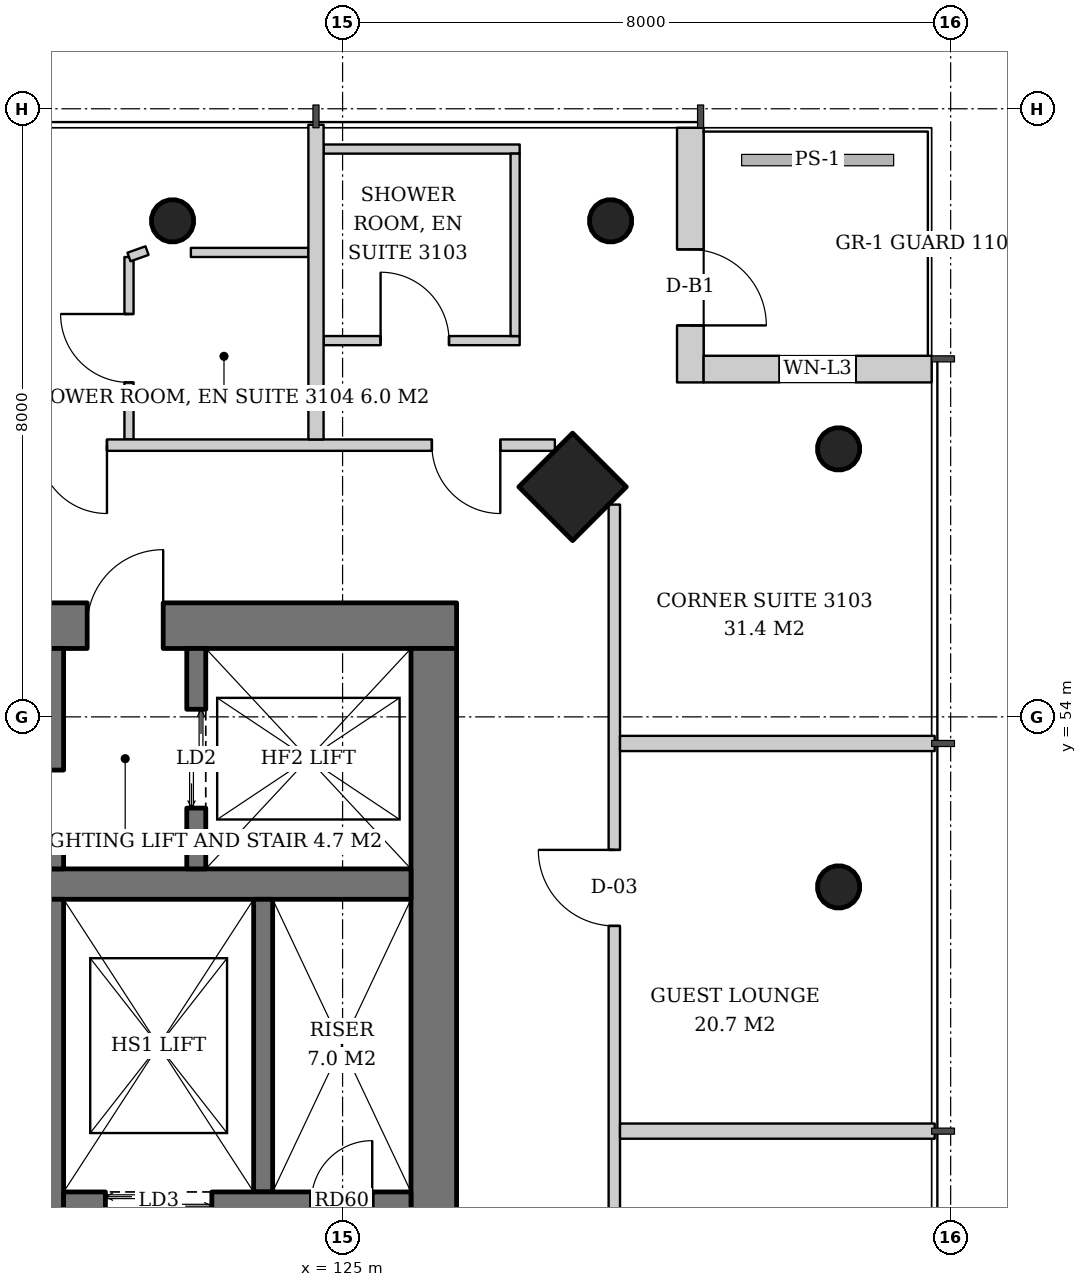
"""IFC4 building model, lengths in metres.
Left out: names, types, materials, properties, quantities, classifications, styles, units other than length and angle.
Written with IfcOpenShell. Run it as: python <this file> out.ifc"""

import sys

from ifc_helpers import new_model, si_unit, direction, frame, frame_2d, origin, origin_2d, place, context, subcontext, project, spatial, rectangle, hollow_circle, extrude, element, fill, save


model = new_model("IFC4")
c1 = context("Model", 3, precision=1e-05, world=origin(), true_north=direction((0.0, 1.0)))
c2 = subcontext(c1, "Body", "Model", "MODEL_VIEW")
j1 = project(units=[si_unit("LENGTHUNIT", "METRE"), si_unit("PLANEANGLEUNIT", "RADIAN")], contexts=[c1])
p1 = place(None, origin())
s1 = spatial("IfcSite", under=j1, at=p1, CompositionType="ELEMENT")
p2 = place(p1, origin())
s2 = spatial("IfcBuilding", under=s1, at=p2, CompositionType="ELEMENT")
p3 = place(p2, frame((0.0, 0.0, 123.6)))
s3 = spatial("IfcBuildingStorey", under=s2, at=p3, CompositionType="ELEMENT", Elevation=123.6)
p4 = place(p3, frame((128.078, 57.078, 0.0), z_axis=(-0.043032401563, -0.043032401563, 0.998146494675), x_axis=(0.707106781187, -0.707106781187, 0.0)))
e1 = element("IfcColumn", 1, at=p4, inside=s3, PredefinedType="COLUMN", context=c2, shape_type="SweptSolid", body=[
    extrude(rectangle(XDim=1.0, YDim=1.0, at=origin_2d()), origin(), (0.0, 0.0, 1.0), 3.807),
])
p5 = place(p3, frame((131.578, 57.578, 0.0), z_axis=(-0.043032401563, -0.043032401563, 0.998146494675), x_axis=(0.707106781187, -0.707106781187, 0.0)))
e2 = element("IfcColumn", 2, at=p5, inside=s3, PredefinedType="COLUMN", context=c2, shape_type="SweptSolid", body=[
    extrude(hollow_circle(Radius=0.28, WallThickness=0.02, at=origin_2d()), origin(), (0.0, 0.0, 1.0), 3.807),
])
p6 = place(p3, frame((131.578, 51.789, 0.0), z_axis=(-0.043062285527, -0.021563230905, 0.998839660125), x_axis=(0.44774654769, -0.894160516368, 0.0)))
e3 = element("IfcColumn", 3, at=p6, inside=s3, PredefinedType="COLUMN", context=c2, shape_type="SweptSolid", body=[
    extrude(hollow_circle(Radius=0.28, WallThickness=0.02, at=origin_2d()), origin(), (0.0, 0.0, 1.0), 3.804),
])
p7 = place(p3, frame((128.578, 60.578, 0.0), z_axis=(-0.043032401563, -0.043032401563, 0.998146494675), x_axis=(0.707106781187, -0.707106781187, 0.0)))
e4 = element("IfcColumn", 4, at=p7, inside=s3, PredefinedType="COLUMN", context=c2, shape_type="SweptSolid", body=[
    extrude(hollow_circle(Radius=0.28, WallThickness=0.02, at=origin_2d()), origin(), (0.0, 0.0, 1.0), 3.807),
])
p8 = place(p3, frame((122.789, 60.578, 0.0), z_axis=(-0.021563230905, -0.043062285527, 0.998839660125), x_axis=(0.894160516368, -0.44774654769, 0.0)))
e5 = element("IfcColumn", 5, at=p8, inside=s3, PredefinedType="COLUMN", context=c2, shape_type="SweptSolid", body=[
    extrude(hollow_circle(Radius=0.28, WallThickness=0.02, at=origin_2d()), origin(), (0.0, 0.0, 1.0), 3.804),
])
p9 = place(p3, frame((107.5, 55.2, 0.0), z_axis=(0.0, 0.0, 1.0), x_axis=(1.0, 0.0, 0.0)))
e6 = element("IfcWall", 6, at=p9, inside=s3, PredefinedType="SHEAR", context=c2, shape_type="SweptSolid", body=[
    extrude(rectangle(XDim=19.0, YDim=0.6, at=frame_2d((9.5, 0.0))), origin(), (0.0, 0.0, 1.0), 3.8),
])
p10 = place(p9, frame((14.14, 0.0, 0.0)))
e7 = element("IfcOpeningElement", 7, at=p10, cuts=e6, PredefinedType="OPENING", context=c2, shape_type="SweptSolid", body=[
    extrude(rectangle(XDim=1.0, YDim=2.1, at=frame_2d((0.5, 1.05))), frame((0.0, 0.31, 0.0), z_axis=(0.0, -1.0, 0.0), x_axis=(1.0, 0.0, 0.0)), (0.0, 0.0, 1.0), 0.62),
])
p11 = place(p9, frame((1.024, 0.0, 0.0)))
e8 = element("IfcOpeningElement", 8, at=p11, cuts=e6, PredefinedType="OPENING", context=c2, shape_type="SweptSolid", body=[
    extrude(rectangle(XDim=1.0, YDim=2.1, at=frame_2d((0.5, 1.05))), frame((0.0, 0.31, 0.0), z_axis=(0.0, -1.0, 0.0), x_axis=(1.0, 0.0, 0.0)), (0.0, 0.0, 1.0), 0.62),
])
p12 = place(p9, frame((3.262, 0.0, 0.0)))
e9 = element("IfcOpeningElement", 9, at=p12, cuts=e6, PredefinedType="OPENING", context=c2, shape_type="SweptSolid", body=[
    extrude(rectangle(XDim=1.0, YDim=2.1, at=frame_2d((0.5, 1.05))), frame((0.0, 0.31, 0.0), z_axis=(0.0, -1.0, 0.0), x_axis=(1.0, 0.0, 0.0)), (0.0, 0.0, 1.0), 0.62),
])
p13 = place(p3, frame((126.2, 37.1, 0.0), z_axis=(0.0, 0.0, 1.0), x_axis=(0.0, 1.0, 0.0)))
e10 = element("IfcWall", 10, at=p13, inside=s3, PredefinedType="SHEAR", context=c2, shape_type="SweptSolid", body=[
    extrude(rectangle(XDim=17.8, YDim=0.6, at=frame_2d((8.9, 0.0))), origin(), (0.0, 0.0, 1.0), 3.8),
])
p14 = place(p13, frame((8.0, 0.0, 0.0)))
e11 = element("IfcOpeningElement", 11, at=p14, cuts=e10, PredefinedType="OPENING", context=c2, shape_type="SweptSolid", body=[
    extrude(rectangle(XDim=1.8, YDim=2.4, at=frame_2d((0.9, 1.2))), frame((0.0, 0.31, 0.0), z_axis=(0.0, -1.0, 0.0), x_axis=(1.0, 0.0, 0.0)), (0.0, 0.0, 1.0), 0.62),
])
p15 = place(p3, frame((108.1, 51.8, 0.0), z_axis=(0.0, 0.0, 1.0), x_axis=(1.0, 0.0, 0.0)))
e12 = element("IfcWall", 12, at=p15, inside=s3, PredefinedType="SHEAR", context=c2, shape_type="SweptSolid", body=[
    extrude(rectangle(XDim=17.8, YDim=0.4, at=frame_2d((8.9, 0.0))), origin(), (0.0, 0.0, 1.0), 3.8),
])
p16 = place(p3, frame((121.13, 40.4, 0.0), z_axis=(0.0, 0.0, 1.0), x_axis=(0.0, 1.0, 0.0)))
e13 = element("IfcWall", 13, at=p16, inside=s3, PredefinedType="SHEAR", context=c2, shape_type="SweptSolid", body=[
    extrude(rectangle(XDim=11.2, YDim=0.4, at=frame_2d((5.6, 0.0))), origin(), (0.0, 0.0, 1.0), 3.8),
])
p17 = place(p3, frame((121.13, 52.0, 0.0), z_axis=(0.0, 0.0, 1.0), x_axis=(0.0, 1.0, 0.0)))
e14 = element("IfcWall", 14, at=p17, inside=s3, PredefinedType="SHEAR", context=c2, shape_type="SweptSolid", body=[
    extrude(rectangle(XDim=2.9, YDim=0.4, at=frame_2d((1.45, 0.0))), origin(), (0.0, 0.0, 1.0), 3.8),
])
p18 = place(p17, frame((0.3, 0.0, 0.0)))
e15 = element("IfcOpeningElement", 15, at=p18, cuts=e14, PredefinedType="OPENING", context=c2, shape_type="SweptSolid", body=[
    extrude(rectangle(XDim=1.0, YDim=2.1, at=frame_2d((0.5, 1.05))), frame((0.0, 0.21, 0.0), z_axis=(0.0, -1.0, 0.0), x_axis=(1.0, 0.0, 0.0)), (0.0, 0.0, 1.0), 0.42),
])
p19 = place(p3, frame((129.575, 61.75, 0.0), z_axis=(0.0, 0.0, 1.0), x_axis=(0.0, -1.0, 0.0)))
e16 = element("IfcWall", 16, at=p19, inside=s3, PredefinedType="SOLIDWALL", context=c2, shape_type="SweptSolid", body=[
    extrude(rectangle(XDim=3.35, YDim=0.35, at=frame_2d((1.675, 0.0))), origin(), (0.0, 0.0, 1.0), 3.6),
])
p20 = place(p19, frame((1.6, 0.0, 0.0)))
e17 = element("IfcOpeningElement", 17, at=p20, cuts=e16, PredefinedType="OPENING", context=c2, shape_type="SweptSolid", body=[
    extrude(rectangle(XDim=1.0, YDim=2.4, at=frame_2d((0.5, 1.2))), frame((0.0, 0.185, 0.0), z_axis=(0.0, -1.0, 0.0), x_axis=(1.0, 0.0, 0.0)), (0.0, 0.0, 1.0), 0.37),
])
p21 = place(p3, frame((129.75, 58.575, 0.0), z_axis=(0.0, 0.0, 1.0), x_axis=(1.0, 0.0, 0.0)))
e18 = element("IfcWall", 18, at=p21, inside=s3, PredefinedType="SOLIDWALL", context=c2, shape_type="SweptSolid", body=[
    extrude(rectangle(XDim=3.0, YDim=0.35, at=frame_2d((1.5, 0.0))), origin(), (0.0, 0.0, 1.0), 3.6),
])
p22 = place(p21, frame((1.0, 0.0, 0.9)))
e19 = element("IfcOpeningElement", 19, at=p22, cuts=e18, PredefinedType="OPENING", context=c2, shape_type="SweptSolid", body=[
    extrude(rectangle(XDim=1.0, YDim=2.4, at=frame_2d((0.5, 1.2))), frame((0.0, 0.185, 0.0), z_axis=(0.0, -1.0, 0.0), x_axis=(1.0, 0.0, 0.0)), (0.0, 0.0, 1.0), 0.37),
])
p23 = place(p3, frame((123.075, 52.0, 0.0), z_axis=(0.0, 0.0, 1.0), x_axis=(0.0, 1.0, 0.0)))
e20 = element("IfcWall", 20, at=p23, inside=s3, PredefinedType="SHEAR", context=c2, shape_type="SweptSolid", body=[
    extrude(rectangle(XDim=2.9, YDim=0.25, at=frame_2d((1.45, 0.0))), origin(), (0.0, 0.0, 1.0), 3.8),
])
p24 = place(p23, frame((0.8, 0.0, 0.0)))
e21 = element("IfcOpeningElement", 21, at=p24, cuts=e20, PredefinedType="OPENING", context=c2, shape_type="SweptSolid", body=[
    extrude(rectangle(XDim=1.3, YDim=2.2, at=frame_2d((0.65, 1.1))), frame((0.0, 0.135, 0.0), z_axis=(0.0, -1.0, 0.0), x_axis=(1.0, 0.0, 0.0)), (0.0, 0.0, 1.0), 0.27),
])
p25 = place(p3, frame((123.955, 47.75, 0.0), z_axis=(0.0, 0.0, 1.0), x_axis=(0.0, 1.0, 0.0)))
e22 = element("IfcWall", 22, at=p25, inside=s3, PredefinedType="SHEAR", context=c2, shape_type="SweptSolid", body=[
    extrude(rectangle(XDim=3.85, YDim=0.25, at=frame_2d((1.925, 0.0))), origin(), (0.0, 0.0, 1.0), 3.8),
])
p26 = place(p3, frame((121.33, 47.625, 0.0), z_axis=(0.0, 0.0, 1.0), x_axis=(1.0, 0.0, 0.0)))
e23 = element("IfcWall", 23, at=p26, inside=s3, PredefinedType="SHEAR", context=c2, shape_type="SweptSolid", body=[
    extrude(rectangle(XDim=4.57, YDim=0.25, at=frame_2d((2.285, 0.0))), origin(), (0.0, 0.0, 1.0), 3.8),
])
p27 = place(p26, frame((0.55, 0.0, 0.0)))
e24 = element("IfcOpeningElement", 24, at=p27, cuts=e23, PredefinedType="OPENING", context=c2, shape_type="SweptSolid", body=[
    extrude(rectangle(XDim=1.4, YDim=2.4, at=frame_2d((0.7, 1.2))), frame((0.0, 0.135, 0.0), z_axis=(0.0, -1.0, 0.0), x_axis=(1.0, 0.0, 0.0)), (0.0, 0.0, 1.0), 0.27),
])
p28 = place(p26, frame((3.26, 0.0, 0.0)))
e25 = element("IfcOpeningElement", 25, at=p28, cuts=e23, PredefinedType="OPENING", context=c2, shape_type="SweptSolid", body=[
    extrude(rectangle(XDim=0.8, YDim=2.0, at=frame_2d((0.4, 1.0))), frame((0.0, 0.135, 0.0), z_axis=(0.0, -1.0, 0.0), x_axis=(1.0, 0.0, 0.0)), (0.0, 0.0, 1.0), 0.27),
])
p29 = place(p3, frame((128.575, 35.207, 0.0), z_axis=(0.0, 0.0, 1.0), x_axis=(0.0, 1.0, 0.0)))
e26 = element("IfcWall", 26, at=p29, inside=s3, PredefinedType="PARTITIONING", context=c2, shape_type="SweptSolid", body=[
    extrude(rectangle(XDim=21.586, YDim=0.15, at=frame_2d((10.793, 0.0))), origin(), (0.0, 0.0, 1.0), 2.9),
])
p30 = place(p29, frame((0.718, 0.0, 0.0)))
e27 = element("IfcOpeningElement", 27, at=p30, cuts=e26, PredefinedType="OPENING", context=c2, shape_type="SweptSolid", body=[
    extrude(rectangle(XDim=0.9, YDim=2.1, at=frame_2d((0.45, 1.05))), frame((0.0, 0.085, 0.0), z_axis=(0.0, -1.0, 0.0), x_axis=(1.0, 0.0, 0.0)), (0.0, 0.0, 1.0), 0.17),
])
p31 = place(p29, frame((5.893, 0.0, 0.0)))
e28 = element("IfcOpeningElement", 28, at=p31, cuts=e26, PredefinedType="OPENING", context=c2, shape_type="SweptSolid", body=[
    extrude(rectangle(XDim=0.9, YDim=2.1, at=frame_2d((0.45, 1.05))), frame((0.0, 0.085, 0.0), z_axis=(0.0, -1.0, 0.0), x_axis=(1.0, 0.0, 0.0)), (0.0, 0.0, 1.0), 0.17),
])
p32 = place(p29, frame((16.043, 0.0, 0.0)))
e29 = element("IfcOpeningElement", 29, at=p32, cuts=e26, PredefinedType="OPENING", context=c2, shape_type="SweptSolid", body=[
    extrude(rectangle(XDim=1.0, YDim=2.1, at=frame_2d((0.5, 1.05))), frame((0.0, 0.085, 0.0), z_axis=(0.0, -1.0, 0.0), x_axis=(1.0, 0.0, 0.0)), (0.0, 0.0, 1.0), 0.17),
])
p33 = place(p3, frame((128.65, 48.55, 0.0), z_axis=(0.0, 0.0, 1.0), x_axis=(1.0, 0.0, 0.0)))
e30 = element("IfcWall", 30, at=p33, inside=s3, PredefinedType="PARTITIONING", context=c2, shape_type="SweptSolid", body=[
    extrude(rectangle(XDim=4.14, YDim=0.2, at=frame_2d((2.07, 0.0))), origin(), (0.0, 0.0, 1.0), 3.0),
])
p34 = place(p3, frame((128.65, 53.65, 0.0), z_axis=(0.0, 0.0, 1.0), x_axis=(1.0, 0.0, 0.0)))
e31 = element("IfcWall", 31, at=p34, inside=s3, PredefinedType="PARTITIONING", context=c2, shape_type="SweptSolid", body=[
    extrude(rectangle(XDim=4.14, YDim=0.2, at=frame_2d((2.07, 0.0))), origin(), (0.0, 0.0, 1.0), 3.2),
])
p35 = place(p3, frame((124.75, 58.95, 0.0), z_axis=(0.0, 0.0, 1.0), x_axis=(1.0, 0.0, 0.0)))
e32 = element("IfcWall", 32, at=p35, inside=s3, PredefinedType="PARTITIONING", context=c2, shape_type="SweptSolid", body=[
    extrude(rectangle(XDim=2.58, YDim=0.12, at=frame_2d((1.29, 0.0))), origin(), (0.0, 0.0, 1.0), 2.9),
])
p36 = place(p35, frame((0.75, 0.0, 0.0)))
e33 = element("IfcOpeningElement", 33, at=p36, cuts=e32, PredefinedType="OPENING", context=c2, shape_type="SweptSolid", body=[
    extrude(rectangle(XDim=0.9, YDim=2.1, at=frame_2d((0.45, 1.05))), frame((0.0, 0.07, 0.0), z_axis=(0.0, -1.0, 0.0), x_axis=(1.0, 0.0, 0.0)), (0.0, 0.0, 1.0), 0.14),
])
p37 = place(p3, frame((124.75, 61.47, 0.0), z_axis=(0.0, 0.0, 1.0), x_axis=(1.0, 0.0, 0.0)))
e34 = element("IfcWall", 34, at=p37, inside=s3, PredefinedType="PARTITIONING", context=c2, shape_type="SweptSolid", body=[
    extrude(rectangle(XDim=2.58, YDim=0.12, at=frame_2d((1.29, 0.0))), origin(), (0.0, 0.0, 1.0), 3.6),
])
p38 = place(p3, frame((127.27, 59.01, 0.0), z_axis=(0.0, 0.0, 1.0), x_axis=(0.0, 1.0, 0.0)))
e35 = element("IfcWall", 35, at=p38, inside=s3, PredefinedType="PARTITIONING", context=c2, shape_type="SweptSolid", body=[
    extrude(rectangle(XDim=2.4, YDim=0.12, at=frame_2d((1.2, 0.0))), origin(), (0.0, 0.0, 1.0), 3.2),
])
p39 = place(p3, frame((124.55, 60.11, 0.0), z_axis=(0.0, 0.0, 1.0), x_axis=(-1.0, 0.0, 0.0)))
e36 = element("IfcWall", 36, at=p39, inside=s3, PredefinedType="PARTITIONING", context=c2, shape_type="SweptSolid", body=[
    extrude(rectangle(XDim=1.546, YDim=0.12, at=frame_2d((0.773, 0.0))), origin(), (0.0, 0.0, 1.0), 3.6),
])
p40 = place(p3, frame((122.19, 57.65, 0.0), z_axis=(0.0, 0.0, 1.0), x_axis=(0.0, 1.0, 0.0)))
e37 = element("IfcWall", 37, at=p40, inside=s3, PredefinedType="PARTITIONING", context=c2, shape_type="SweptSolid", body=[
    extrude(rectangle(XDim=2.4, YDim=0.12, at=frame_2d((1.2, 0.0))), origin(), (0.0, 0.0, 1.0), 3.0),
])
p41 = place(p40, frame((0.75, 0.0, 0.0)))
e38 = element("IfcOpeningElement", 38, at=p41, cuts=e37, PredefinedType="OPENING", context=c2, shape_type="SweptSolid", body=[
    extrude(rectangle(XDim=0.9, YDim=2.1, at=frame_2d((0.45, 1.05))), frame((0.0, 0.07, 0.0), z_axis=(0.0, -1.0, 0.0), x_axis=(1.0, 0.0, 0.0)), (0.0, 0.0, 1.0), 0.14),
])
p42 = place(p3, frame((127.793, 57.575, 0.0), z_axis=(0.0, 0.0, 1.0), x_axis=(-1.0, 0.0, 0.0)))
e39 = element("IfcWall", 39, at=p42, inside=s3, PredefinedType="PARTITIONING", context=c2, shape_type="SweptSolid", body=[
    extrude(rectangle(XDim=21.586, YDim=0.15, at=frame_2d((10.793, 0.0))), origin(), (0.0, 0.0, 1.0), 2.9),
])
p43 = place(p42, frame((0.718, 0.0, 0.0)))
e40 = element("IfcOpeningElement", 40, at=p43, cuts=e39, PredefinedType="OPENING", context=c2, shape_type="SweptSolid", body=[
    extrude(rectangle(XDim=0.9, YDim=2.1, at=frame_2d((0.45, 1.05))), frame((0.0, 0.085, 0.0), z_axis=(0.0, -1.0, 0.0), x_axis=(1.0, 0.0, 0.0)), (0.0, 0.0, 1.0), 0.17),
])
p44 = place(p42, frame((5.893, 0.0, 0.0)))
e41 = element("IfcOpeningElement", 41, at=p44, cuts=e39, PredefinedType="OPENING", context=c2, shape_type="SweptSolid", body=[
    extrude(rectangle(XDim=0.9, YDim=2.1, at=frame_2d((0.45, 1.05))), frame((0.0, 0.085, 0.0), z_axis=(0.0, -1.0, 0.0), x_axis=(1.0, 0.0, 0.0)), (0.0, 0.0, 1.0), 0.17),
])
p45 = place(p42, frame((16.043, 0.0, 0.0)))
e42 = element("IfcOpeningElement", 42, at=p45, cuts=e39, PredefinedType="OPENING", context=c2, shape_type="SweptSolid", body=[
    extrude(rectangle(XDim=1.0, YDim=2.1, at=frame_2d((0.5, 1.05))), frame((0.0, 0.085, 0.0), z_axis=(0.0, -1.0, 0.0), x_axis=(1.0, 0.0, 0.0)), (0.0, 0.0, 1.0), 0.17),
])
p46 = place(p3, frame((124.65, 57.65, 0.0), z_axis=(0.0, 0.0, 1.0), x_axis=(0.0, 1.0, 0.0)))
e43 = element("IfcWall", 43, at=p46, inside=s3, PredefinedType="PARTITIONING", context=c2, shape_type="SweptSolid", body=[
    extrude(rectangle(XDim=4.14, YDim=0.2, at=frame_2d((2.07, 0.0))), origin(), (0.0, 0.0, 1.0), 3.2),
])
p47 = place(p3, frame((122.19, 60.05, 0.0), z_axis=(0.0, 0.0, 1.0), x_axis=(0.942506501315, 0.33418781393, 0.0)))
e44 = element("IfcWall", 44, at=p47, inside=s3, PredefinedType="PARTITIONING", context=c2, shape_type="SweptSolid", body=[
    extrude(rectangle(XDim=0.252, YDim=0.12, at=frame_2d((0.126, 0.0))), origin(), (0.0, 0.0, 1.0), 3.0),
])
p48 = place(p20, origin())
e45 = element("IfcDoor", 45, at=p48, inside=s3, OperationType="SINGLE_SWING_RIGHT", PredefinedType="DOOR", context=c2, shape_type="SweptSolid", body=[
    extrude(rectangle(XDim=1.0, YDim=2.4, at=frame_2d((0.5, 1.2))), frame((0.0, 0.025, 0.0), z_axis=(0.0, -1.0, 0.0), x_axis=(1.0, 0.0, 0.0)), (0.0, 0.0, 1.0), 0.05),
])
fill(e17, e45)
p49 = place(p22, origin())
e46 = element("IfcWindow", 46, at=p49, inside=s3, PartitioningType="SINGLE_PANEL", PredefinedType="WINDOW", context=c2, shape_type="SweptSolid", body=[
    extrude(rectangle(XDim=1.0, YDim=2.4, at=frame_2d((0.5, 1.2))), frame((0.0, 0.03, 0.0), z_axis=(0.0, -1.0, 0.0), x_axis=(1.0, 0.0, 0.0)), (0.0, 0.0, 1.0), 0.06),
])
fill(e19, e46)
p50 = place(p24, origin())
e47 = element("IfcDoor", 47, at=p50, inside=s3, OperationType="DOUBLE_DOOR_SLIDING", PredefinedType="DOOR", context=c2, shape_type="SweptSolid", body=[
    extrude(rectangle(XDim=1.3, YDim=2.2, at=frame_2d((0.65, 1.1))), frame((0.0, 0.025, 0.0), z_axis=(0.0, -1.0, 0.0), x_axis=(1.0, 0.0, 0.0)), (0.0, 0.0, 1.0), 0.05),
])
fill(e21, e47)
p51 = place(p27, origin())
e48 = element("IfcDoor", 48, at=p51, inside=s3, OperationType="DOUBLE_DOOR_SLIDING", PredefinedType="DOOR", context=c2, shape_type="SweptSolid", body=[
    extrude(rectangle(XDim=1.4, YDim=2.4, at=frame_2d((0.7, 1.2))), frame((0.0, 0.025, 0.0), z_axis=(0.0, -1.0, 0.0), x_axis=(1.0, 0.0, 0.0)), (0.0, 0.0, 1.0), 0.05),
])
fill(e24, e48)
p52 = place(p28, origin())
e49 = element("IfcDoor", 49, at=p52, inside=s3, OperationType="SINGLE_SWING_RIGHT", PredefinedType="DOOR", context=c2, shape_type="SweptSolid", body=[
    extrude(rectangle(XDim=0.8, YDim=2.0, at=frame_2d((0.4, 1.0))), frame((0.0, 0.025, 0.0), z_axis=(0.0, -1.0, 0.0), x_axis=(1.0, 0.0, 0.0)), (0.0, 0.0, 1.0), 0.05),
])
fill(e25, e49)
p53 = place(p10, origin())
e50 = element("IfcDoor", 50, at=p53, inside=s3, OperationType="SINGLE_SWING_RIGHT", PredefinedType="DOOR", context=c2, shape_type="SweptSolid", body=[
    extrude(rectangle(XDim=1.0, YDim=2.1, at=frame_2d((0.5, 1.05))), frame((0.0, 0.025, 0.0), z_axis=(0.0, -1.0, 0.0), x_axis=(1.0, 0.0, 0.0)), (0.0, 0.0, 1.0), 0.05),
])
fill(e7, e50)
p54 = place(p32, origin())
e51 = element("IfcDoor", 51, at=p54, inside=s3, OperationType="SINGLE_SWING_RIGHT", PredefinedType="DOOR", context=c2, shape_type="SweptSolid", body=[
    extrude(rectangle(XDim=1.0, YDim=2.1, at=frame_2d((0.5, 1.05))), frame((0.0, 0.025, 0.0), z_axis=(0.0, -1.0, 0.0), x_axis=(1.0, 0.0, 0.0)), (0.0, 0.0, 1.0), 0.05),
])
fill(e29, e51)
p55 = place(p36, origin())
e52 = element("IfcDoor", 52, at=p55, inside=s3, OperationType="SINGLE_SWING_LEFT", PredefinedType="DOOR", context=c2, shape_type="SweptSolid", body=[
    extrude(rectangle(XDim=0.9, YDim=2.1, at=frame_2d((0.45, 1.05))), frame((0.0, 0.025, 0.0), z_axis=(0.0, -1.0, 0.0), x_axis=(1.0, 0.0, 0.0)), (0.0, 0.0, 1.0), 0.05),
])
fill(e33, e52)
p56 = place(p41, origin())
e53 = element("IfcDoor", 53, at=p56, inside=s3, OperationType="SINGLE_SWING_RIGHT", PredefinedType="DOOR", context=c2, shape_type="SweptSolid", body=[
    extrude(rectangle(XDim=0.9, YDim=2.1, at=frame_2d((0.45, 1.05))), frame((0.0, 0.025, 0.0), z_axis=(0.0, -1.0, 0.0), x_axis=(1.0, 0.0, 0.0)), (0.0, 0.0, 1.0), 0.05),
])
fill(e38, e53)
p57 = place(p43, origin())
e54 = element("IfcDoor", 54, at=p57, inside=s3, OperationType="SINGLE_SWING_LEFT", PredefinedType="DOOR", context=c2, shape_type="SweptSolid", body=[
    extrude(rectangle(XDim=0.9, YDim=2.1, at=frame_2d((0.45, 1.05))), frame((0.0, 0.025, 0.0), z_axis=(0.0, -1.0, 0.0), x_axis=(1.0, 0.0, 0.0)), (0.0, 0.0, 1.0), 0.05),
])
fill(e40, e54)
p58 = place(p44, origin())
e55 = element("IfcDoor", 55, at=p58, inside=s3, OperationType="SINGLE_SWING_LEFT", PredefinedType="DOOR", context=c2, shape_type="SweptSolid", body=[
    extrude(rectangle(XDim=0.9, YDim=2.1, at=frame_2d((0.45, 1.05))), frame((0.0, 0.025, 0.0), z_axis=(0.0, -1.0, 0.0), x_axis=(1.0, 0.0, 0.0)), (0.0, 0.0, 1.0), 0.05),
])
fill(e41, e55)
save(model, sys.argv[1])
